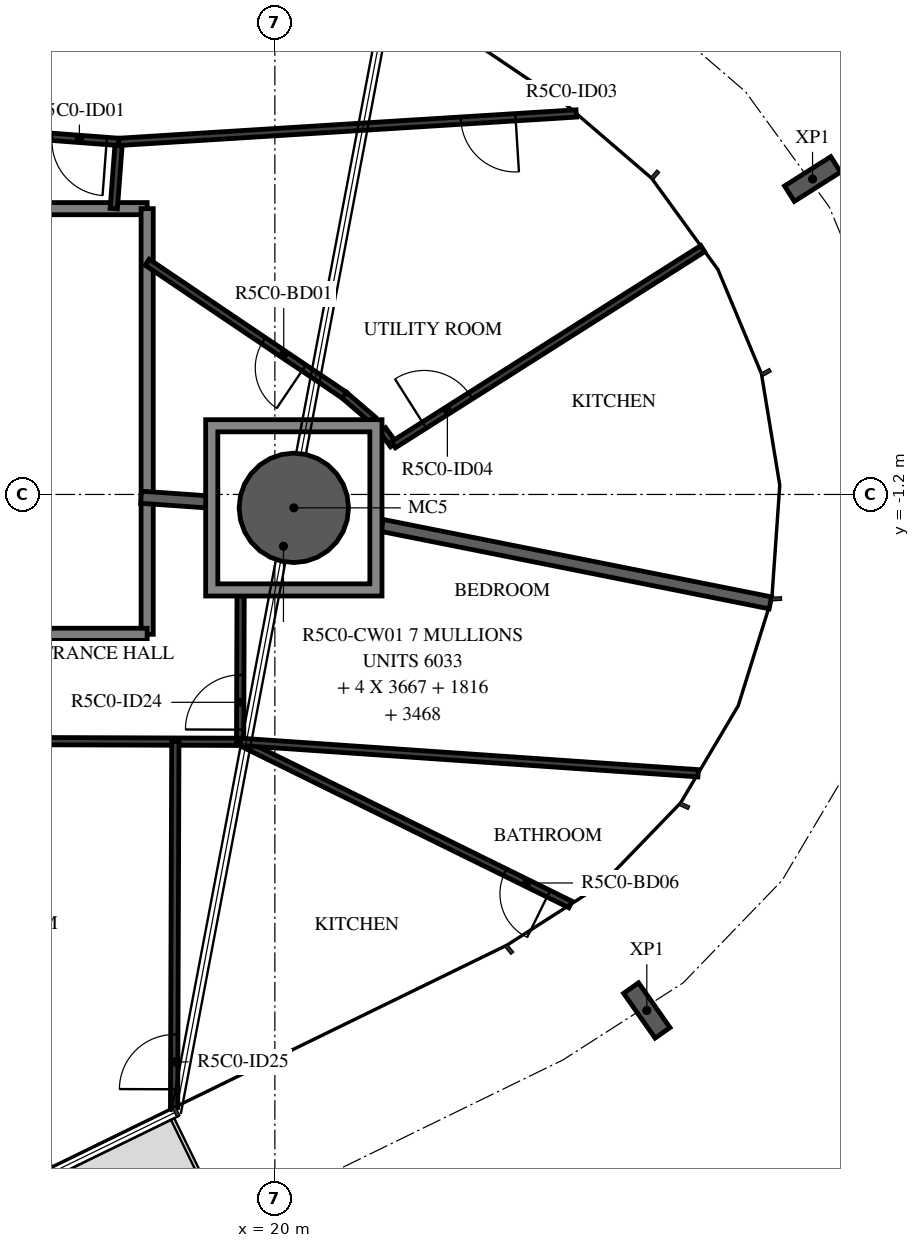
"""IFC4 building model, lengths in metres.
Left out: names, types, materials, properties, quantities, classifications, styles, units other than length and angle.
Written with IfcOpenShell. Run it as: python <this file> out.ifc"""

import sys

from ifc_helpers import new_model, si_unit, direction, frame, frame_2d, origin, origin_2d, place, context, subcontext, project, spatial, polyline, rectangle, hollow_circle, i_section, outline, extrude, element, fill, save


model = new_model("IFC4")
c1 = context("Model", 3, precision=1e-05, world=origin(), true_north=direction((0.0, 1.0)))
c2 = subcontext(c1, "Body", "Model", "MODEL_VIEW")
j1 = project(units=[si_unit("LENGTHUNIT", "METRE"), si_unit("PLANEANGLEUNIT", "RADIAN")], contexts=[c1])
p1 = place(None, origin())
s1 = spatial("IfcSite", under=j1, at=p1, CompositionType="ELEMENT")
p2 = place(p1, origin())
s2 = spatial("IfcBuilding", under=s1, at=p2, CompositionType="ELEMENT")
p3 = place(p2, frame((0.0, 0.0, 216.4)))
s3 = spatial("IfcBuildingStorey", under=s2, at=p3, CompositionType="ELEMENT", Elevation=216.4)
p4 = place(p3, frame((20.312, -1.42, -0.38), z_axis=(0.0, 0.0, 1.0), x_axis=(1.0, 0.0, 0.0)))
e1 = element("IfcColumn", 1, at=p4, inside=s3, PredefinedType="COLUMN", context=c2, shape_type="SweptSolid", body=[
    extrude(hollow_circle(Radius=0.9, WallThickness=0.04, at=origin_2d()), origin(), (0.0, 0.0, 1.0), 2.616),
])
for number, where, z_axis, x_axis in (
    (2, (26.117, -9.686, -0.38), (0.0, 0.0, 1.0), (-0.818, -0.575, 0.0)),
    (3, (28.842, 3.987, -0.38), (0.0, 0.0, 1.0), (0.535, -0.845, 0.0)),
):
    element("IfcColumn", number, at=place(p3, frame(where, z_axis=z_axis, x_axis=x_axis)), inside=s3, PredefinedType="COLUMN", context=c2, shape_type="SweptSolid", body=[
        extrude(i_section(OverallWidth=0.3, OverallDepth=0.9, WebThickness=0.019, FlangeThickness=0.035, FilletRadius=0.03, at=origin_2d()), origin(), (0.0, 0.0, 1.0), 2.616),
    ])
p5 = place(p3, frame((17.9, 3.5, 0.0), z_axis=(0.0, 0.0, 1.0), x_axis=(-1.0, 0.0, 0.0)))
e4 = element("IfcWall", 4, at=p5, inside=s3, PredefinedType="STANDARD", context=c2, shape_type="SweptSolid", body=[
    extrude(rectangle(XDim=4.698, YDim=0.2, at=frame_2d((2.349, 0.0))), origin(), (0.0, 0.0, 1.0), 3.05),
])
p6 = place(p3, frame((17.9, -3.5, 0.0), z_axis=(0.0, 0.0, 1.0), x_axis=(0.0, 1.0, 0.0)))
e5 = element("IfcWall", 5, at=p6, inside=s3, PredefinedType="STANDARD", context=c2, shape_type="SweptSolid", body=[
    extrude(rectangle(XDim=7.0, YDim=0.2, at=frame_2d((3.5, 0.0))), origin(), (0.0, 0.0, 1.0), 3.05),
])
p7 = place(p3, frame((13.188, -3.5, 0.0), z_axis=(0.0, 0.0, 1.0), x_axis=(1.0, 0.0, 0.0)))
e6 = element("IfcWall", 6, at=p7, inside=s3, PredefinedType="STANDARD", context=c2, shape_type="SweptSolid", body=[
    extrude(rectangle(XDim=4.712, YDim=0.2, at=frame_2d((2.356, 0.0))), origin(), (0.0, 0.0, 1.0), 3.05),
])
p8 = place(p3, frame((17.8, -1.246, 0.0), z_axis=(0.0, 0.0, 1.0), x_axis=(0.997562681713, -0.069776042122, 0.0)))
e7 = element("IfcWall", 7, at=p8, inside=s3, PredefinedType="STANDARD", context=c2, shape_type="SweptSolid", body=[
    extrude(rectangle(XDim=1.144, YDim=0.2, at=frame_2d((0.572, 0.0))), origin(), (0.0, 0.0, 1.0), 3.05),
])
p9 = place(p3, frame((21.762, -1.709, 0.0), z_axis=(0.0, 0.0, 1.0), x_axis=(0.980707365343, -0.195481619501, 0.0)))
e8 = element("IfcWall", 8, at=p9, inside=s3, PredefinedType="STANDARD", context=c2, shape_type="SweptSolid", body=[
    extrude(rectangle(XDim=6.512, YDim=0.2, at=frame_2d((3.256, 0.0))), origin(), (0.0, 0.0, 1.0), 3.05),
])
p10 = place(p3, frame((17.351, 3.5, 0.0), z_axis=(0.0, 0.0, 1.0), x_axis=(0.075374124137, 0.997155324616, 0.0)))
e9 = element("IfcWall", 9, at=p10, inside=s3, PredefinedType="PARTITIONING", context=c2, shape_type="SweptSolid", body=[
    extrude(rectangle(XDim=1.101, YDim=0.12, at=frame_2d((0.551, 0.0))), origin(), (0.0, 0.0, 1.0), 3.05),
])
p11 = place(p3, frame((17.434, 4.598, 0.0), z_axis=(0.0, 0.0, 1.0), x_axis=(-0.997152077354, 0.075417071205, 0.0)))
e10 = element("IfcWall", 10, at=p11, inside=s3, PredefinedType="PARTITIONING", context=c2, shape_type="SweptSolid", body=[
    extrude(rectangle(XDim=2.787, YDim=0.12, at=frame_2d((1.394, 0.0))), origin(), (0.0, 0.0, 1.0), 3.05),
])
p12 = place(p11, frame((0.2, 0.0, 0.0)))
e11 = element("IfcOpeningElement", 11, at=p12, cuts=e10, PredefinedType="OPENING", context=c2, shape_type="SweptSolid", body=[
    extrude(rectangle(XDim=0.9, YDim=2.1, at=frame_2d((0.45, 1.05))), frame((0.0, 0.07, 0.0), z_axis=(0.0, -1.0, 0.0), x_axis=(1.0, 0.0, 0.0)), (0.0, 0.0, 1.0), 0.14),
])
p13 = place(p3, frame((21.61, 0.03, 0.0), z_axis=(0.0, 0.0, 1.0), x_axis=(-0.758532196215, 0.651635563259, 0.0)))
e12 = element("IfcWall", 12, at=p13, inside=s3, PredefinedType="PARTITIONING", context=c2, shape_type="SweptSolid", body=[
    extrude(rectangle(XDim=0.619, YDim=0.12, at=frame_2d((0.31, 0.0))), origin(), (0.0, 0.0, 1.0), 3.05),
])
p14 = place(p3, frame((21.141, 0.433, 0.0), z_axis=(0.0, 0.0, 1.0), x_axis=(-0.829049908454, 0.559174614313, 0.0)))
e13 = element("IfcWall", 13, at=p14, inside=s3, PredefinedType="PARTITIONING", context=c2, shape_type="SweptSolid", body=[
    extrude(rectangle(XDim=3.909, YDim=0.12, at=frame_2d((1.955, 0.0))), origin(), (0.0, 0.0, 1.0), 3.05),
])
p15 = place(p14, frame((0.8, 0.0, 0.0)))
e14 = element("IfcOpeningElement", 14, at=p15, cuts=e13, PredefinedType="OPENING", context=c2, shape_type="SweptSolid", body=[
    extrude(rectangle(XDim=0.8, YDim=2.1, at=frame_2d((0.4, 1.05))), frame((0.0, 0.07, 0.0), z_axis=(0.0, -1.0, 0.0), x_axis=(1.0, 0.0, 0.0)), (0.0, 0.0, 1.0), 0.14),
])
p16 = place(p3, frame((24.956, 5.065, 0.0), z_axis=(0.0, 0.0, 1.0), x_axis=(-0.998076202118, -0.061999151332, 0.0)))
e15 = element("IfcWall", 15, at=p16, inside=s3, PredefinedType="PARTITIONING", context=c2, shape_type="SweptSolid", body=[
    extrude(rectangle(XDim=7.537, YDim=0.12, at=frame_2d((3.769, 0.0))), origin(), (0.0, 0.0, 1.0), 3.05),
])
p17 = place(p16, frame((1.0, 0.0, 0.0)))
e16 = element("IfcOpeningElement", 16, at=p17, cuts=e15, PredefinedType="OPENING", context=c2, shape_type="SweptSolid", body=[
    extrude(rectangle(XDim=0.9, YDim=2.1, at=frame_2d((0.45, 1.05))), frame((0.0, 0.07, 0.0), z_axis=(0.0, -1.0, 0.0), x_axis=(1.0, 0.0, 0.0)), (0.0, 0.0, 1.0), 0.14),
])
p18 = place(p3, frame((21.772, -0.136, 0.0), z_axis=(0.0, 0.0, 1.0), x_axis=(0.587310294779, -0.809361858285, 0.0)))
e17 = element("IfcWall", 17, at=p18, inside=s3, PredefinedType="PARTITIONING", context=c2, shape_type="SweptSolid", body=[
    extrude(rectangle(XDim=0.303, YDim=0.12, at=frame_2d((0.152, 0.0))), origin(), (0.0, 0.0, 1.0), 3.05),
])
p19 = place(p3, frame((21.95, -0.382, 0.0), z_axis=(0.0, 0.0, 1.0), x_axis=(0.844596663126, 0.535403097336, 0.0)))
e18 = element("IfcWall", 18, at=p19, inside=s3, PredefinedType="PARTITIONING", context=c2, shape_type="SweptSolid", body=[
    extrude(rectangle(XDim=6.022, YDim=0.12, at=frame_2d((3.011, 0.0))), origin(), (0.0, 0.0, 1.0), 3.05),
])
p20 = place(p19, frame((0.6, 0.0, 0.0)))
e19 = element("IfcOpeningElement", 19, at=p20, cuts=e18, PredefinedType="OPENING", context=c2, shape_type="SweptSolid", body=[
    extrude(rectangle(XDim=0.9, YDim=2.1, at=frame_2d((0.45, 1.05))), frame((0.0, 0.07, 0.0), z_axis=(0.0, -1.0, 0.0), x_axis=(1.0, 0.0, 0.0)), (0.0, 0.0, 1.0), 0.14),
])
p21 = place(p3, frame((14.431, -5.251, 0.0), z_axis=(0.0, 0.0, 1.0), x_axis=(0.999994153659, -0.003419451456, 0.0)))
e20 = element("IfcWall", 20, at=p21, inside=s3, PredefinedType="PARTITIONING", context=c2, shape_type="SweptSolid", body=[
    extrude(rectangle(XDim=4.998, YDim=0.12, at=frame_2d((2.499, 0.0))), origin(), (0.0, 0.0, 1.0), 3.05),
])
p22 = place(p3, frame((19.429, -5.268, 0.0), z_axis=(0.0, 0.0, 1.0), x_axis=(0.003360127656, 0.999994354755, 0.0)))
e21 = element("IfcWall", 21, at=p22, inside=s3, PredefinedType="PARTITIONING", context=c2, shape_type="SweptSolid", body=[
    extrude(rectangle(XDim=2.398, YDim=0.12, at=frame_2d((1.199, 0.0))), origin(), (0.0, 0.0, 1.0), 3.05),
])
p23 = place(p22, frame((0.2, 0.0, 0.0)))
e22 = element("IfcOpeningElement", 22, at=p23, cuts=e21, PredefinedType="OPENING", context=c2, shape_type="SweptSolid", body=[
    extrude(rectangle(XDim=0.9, YDim=2.1, at=frame_2d((0.45, 1.05))), frame((0.0, 0.07, 0.0), z_axis=(0.0, -1.0, 0.0), x_axis=(1.0, 0.0, 0.0)), (0.0, 0.0, 1.0), 0.14),
])
p24 = place(p3, frame((18.343, -11.282, 0.0), z_axis=(0.0, 0.0, 1.0), x_axis=(0.003448675073, 0.999994053302, 0.0)))
e23 = element("IfcWall", 23, at=p24, inside=s3, PredefinedType="PARTITIONING", context=c2, shape_type="SweptSolid", body=[
    extrude(rectangle(XDim=6.017, YDim=0.12, at=frame_2d((3.009, 0.0))), origin(), (0.0, 0.0, 1.0), 3.05),
])
p25 = place(p24, frame((0.3, 0.0, 0.0)))
e24 = element("IfcOpeningElement", 24, at=p25, cuts=e23, PredefinedType="OPENING", context=c2, shape_type="SweptSolid", body=[
    extrude(rectangle(XDim=0.9, YDim=2.1, at=frame_2d((0.45, 1.05))), frame((0.0, 0.07, 0.0), z_axis=(0.0, -1.0, 0.0), x_axis=(1.0, 0.0, 0.0)), (0.0, 0.0, 1.0), 0.14),
])
p26 = place(p3, frame((24.861, -7.943, 0.0), z_axis=(0.0, 0.0, 1.0), x_axis=(-0.897128390861, 0.441769906525, 0.0)))
e25 = element("IfcWall", 25, at=p26, inside=s3, PredefinedType="PARTITIONING", context=c2, shape_type="SweptSolid", body=[
    extrude(rectangle(XDim=6.055, YDim=0.12, at=frame_2d((3.027, 0.0))), origin(), (0.0, 0.0, 1.0), 3.05),
])
p27 = place(p26, frame((0.4, 0.0, 0.0)))
e26 = element("IfcOpeningElement", 26, at=p27, cuts=e25, PredefinedType="OPENING", context=c2, shape_type="SweptSolid", body=[
    extrude(rectangle(XDim=0.8, YDim=2.1, at=frame_2d((0.4, 1.05))), frame((0.0, 0.07, 0.0), z_axis=(0.0, -1.0, 0.0), x_axis=(1.0, 0.0, 0.0)), (0.0, 0.0, 1.0), 0.14),
])
p28 = place(p3, frame((26.961, -5.785, 0.0), z_axis=(0.0, 0.0, 1.0), x_axis=(-0.997652165985, 0.068484711466, 0.0)))
e27 = element("IfcWall", 27, at=p28, inside=s3, PredefinedType="PARTITIONING", context=c2, shape_type="SweptSolid", body=[
    extrude(rectangle(XDim=7.551, YDim=0.12, at=frame_2d((3.775, 0.0))), origin(), (0.0, 0.0, 1.0), 3.05),
])
p29 = place(p3, origin())
e28 = element("IfcWall", 28, at=p29, inside=s3, PredefinedType="STANDARD", context=c2, shape_type="SweptSolid", body=[
    extrude(outline(polyline([(21.762, 0.03), (21.762, -2.87), (18.862, -2.87), (18.862, 0.03), (21.762, 0.03)]), holes=[polyline([(19.062, -2.67), (21.562, -2.67), (21.562, -0.17), (19.062, -0.17), (19.062, -2.67)])]), origin(), (0.0, 0.0, 1.0), 3.05),
])
p30 = place(p12, origin())
e29 = element("IfcDoor", 29, at=p30, inside=s3, OperationType="SINGLE_SWING_LEFT", PredefinedType="DOOR", context=c2, shape_type="SweptSolid", body=[
    extrude(rectangle(XDim=0.9, YDim=2.1, at=frame_2d((0.45, 1.05))), frame((0.0, 0.025, 0.0), z_axis=(0.0, -1.0, 0.0), x_axis=(1.0, 0.0, 0.0)), (0.0, 0.0, 1.0), 0.05),
])
fill(e11, e29)
p31 = place(p17, origin())
e30 = element("IfcDoor", 30, at=p31, inside=s3, OperationType="SINGLE_SWING_LEFT", PredefinedType="DOOR", context=c2, shape_type="SweptSolid", body=[
    extrude(rectangle(XDim=0.9, YDim=2.1, at=frame_2d((0.45, 1.05))), frame((0.0, 0.025, 0.0), z_axis=(0.0, -1.0, 0.0), x_axis=(1.0, 0.0, 0.0)), (0.0, 0.0, 1.0), 0.05),
])
fill(e16, e30)
p32 = place(p15, origin())
e31 = element("IfcDoor", 31, at=p32, inside=s3, OperationType="SINGLE_SWING_RIGHT", PredefinedType="DOOR", context=c2, shape_type="SweptSolid", body=[
    extrude(rectangle(XDim=0.8, YDim=2.1, at=frame_2d((0.4, 1.05))), frame((0.0, 0.025, 0.0), z_axis=(0.0, -1.0, 0.0), x_axis=(1.0, 0.0, 0.0)), (0.0, 0.0, 1.0), 0.05),
])
fill(e14, e31)
p33 = place(p20, origin())
e32 = element("IfcDoor", 32, at=p33, inside=s3, OperationType="SINGLE_SWING_LEFT", PredefinedType="DOOR", context=c2, shape_type="SweptSolid", body=[
    extrude(rectangle(XDim=0.9, YDim=2.1, at=frame_2d((0.45, 1.05))), frame((0.0, 0.025, 0.0), z_axis=(0.0, -1.0, 0.0), x_axis=(1.0, 0.0, 0.0)), (0.0, 0.0, 1.0), 0.05),
])
fill(e19, e32)
p34 = place(p23, origin())
e33 = element("IfcDoor", 33, at=p34, inside=s3, OperationType="SINGLE_SWING_RIGHT", PredefinedType="DOOR", context=c2, shape_type="SweptSolid", body=[
    extrude(rectangle(XDim=0.9, YDim=2.1, at=frame_2d((0.45, 1.05))), frame((0.0, 0.025, 0.0), z_axis=(0.0, -1.0, 0.0), x_axis=(1.0, 0.0, 0.0)), (0.0, 0.0, 1.0), 0.05),
])
fill(e22, e33)
p35 = place(p25, origin())
e34 = element("IfcDoor", 34, at=p35, inside=s3, OperationType="SINGLE_SWING_RIGHT", PredefinedType="DOOR", context=c2, shape_type="SweptSolid", body=[
    extrude(rectangle(XDim=0.9, YDim=2.1, at=frame_2d((0.45, 1.05))), frame((0.0, 0.025, 0.0), z_axis=(0.0, -1.0, 0.0), x_axis=(1.0, 0.0, 0.0)), (0.0, 0.0, 1.0), 0.05),
])
fill(e24, e34)
p36 = place(p27, origin())
e35 = element("IfcDoor", 35, at=p36, inside=s3, OperationType="SINGLE_SWING_RIGHT", PredefinedType="DOOR", context=c2, shape_type="SweptSolid", body=[
    extrude(rectangle(XDim=0.8, YDim=2.1, at=frame_2d((0.4, 1.05))), frame((0.0, 0.025, 0.0), z_axis=(0.0, -1.0, 0.0), x_axis=(1.0, 0.0, 0.0)), (0.0, 0.0, 1.0), 0.05),
])
fill(e26, e35)
save(model, sys.argv[1])
